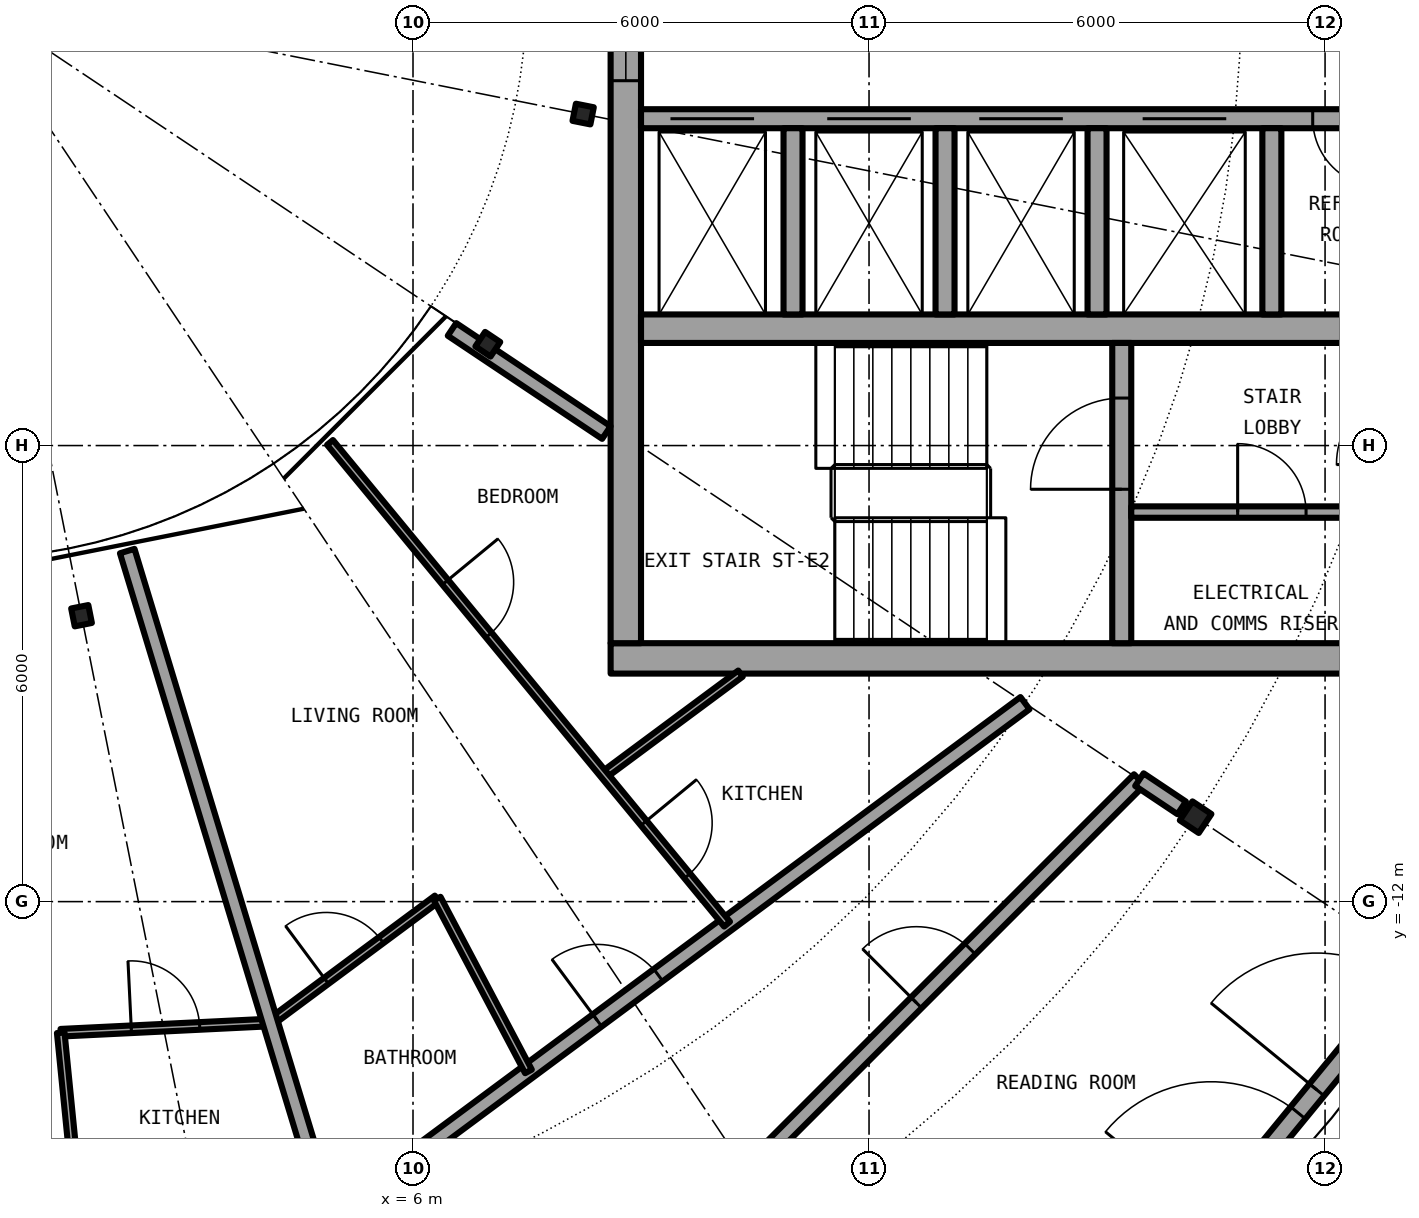
"""IFC4 building model, lengths in metres.
Left out: names, types, materials, properties, quantities, classifications, styles, units other than length and angle.
Written with IfcOpenShell. Run it as: python <this file> out.ifc"""

import sys

from ifc_helpers import new_model, si_unit, direction, frame, frame_2d, origin, origin_2d, place, context, subcontext, project, spatial, rectangle, i_section, extrude, element, fill, save


model = new_model("IFC4")
c1 = context("Model", 3, precision=1e-05, world=origin(), true_north=direction((0.0, 1.0)))
c2 = subcontext(c1, "Body", "Model", "MODEL_VIEW")
j1 = project(units=[si_unit("LENGTHUNIT", "METRE"), si_unit("PLANEANGLEUNIT", "RADIAN")], contexts=[c1])
p1 = place(None, origin())
s1 = spatial("IfcSite", under=j1, at=p1, CompositionType="ELEMENT")
p2 = place(p1, origin())
s2 = spatial("IfcBuilding", under=s1, at=p2, CompositionType="ELEMENT")
p3 = place(p2, frame((0.0, 0.0, 249.3)))
s3 = spatial("IfcBuildingStorey", under=s2, at=p3, CompositionType="ELEMENT", Elevation=249.3)
p4 = place(p3, frame((16.297, -10.889, 0.0), z_axis=(0.0, 0.0, 1.0), x_axis=(0.831469612303, -0.55557023302, 0.0)))
e1 = element("IfcColumn", 1, at=p4, inside=s3, PredefinedType="COLUMN", context=c2, shape_type="SweptSolid", body=[
    extrude(i_section(OverallWidth=0.3, OverallDepth=0.3, WebThickness=0.011, FlangeThickness=0.019, FilletRadius=0.027, at=origin_2d()), origin(), (0.0, 0.0, 1.0), 3.05),
])
for number, where, z_axis, x_axis in (
    (2, (1.639, -8.239, 0.0), (0.0, 0.0, 1.0), (0.195, -0.981, 0.0)),
    (3, (6.984, -4.667, 0.0), (0.0, 0.0, 1.0), (0.831, -0.556, 0.0)),
    (4, (8.239, -1.639, 0.0), (0.0, 0.0, 1.0), (0.981, -0.195, 0.0)),
):
    element("IfcColumn", number, at=place(p3, frame(where, z_axis=z_axis, x_axis=x_axis)), inside=s3, PredefinedType="COLUMN", context=c2, shape_type="SweptSolid", body=[
        extrude(i_section(OverallWidth=0.24, OverallDepth=0.23, WebThickness=0.008, FlangeThickness=0.012, FilletRadius=0.021, at=origin_2d()), origin(), (0.0, 0.0, 1.0), 3.05),
    ])
p5 = place(p3, frame((16.352, -16.352, 0.0), z_axis=(0.0, 0.0, 1.0), x_axis=(0.634418942337, 0.772989395532, 0.0)))
e5 = element("IfcWall", 5, at=p5, inside=s3, PredefinedType="SOLIDWALL", context=c2, shape_type="SweptSolid", body=[
    extrude(rectangle(XDim=4.533, YDim=0.25, at=frame_2d((2.267, 0.0))), origin(), (0.0, 0.0, 1.0), 2.7),
])
p6 = place(p5, frame((0.236, 0.0, 0.0)))
e6 = element("IfcOpeningElement", 6, at=p6, cuts=e5, PredefinedType="OPENING", context=c2, shape_type="SweptSolid", body=[
    extrude(rectangle(XDim=1.8, YDim=2.2, at=frame_2d((0.9, 1.1))), frame((0.0, 0.135, 0.0), z_axis=(0.0, -1.0, 0.0), x_axis=(1.0, 0.0, 0.0)), (0.0, 0.0, 1.0), 0.27),
])
p7 = place(p5, frame((2.427, 0.0, 0.0)))
e7 = element("IfcOpeningElement", 7, at=p7, cuts=e5, PredefinedType="OPENING", context=c2, shape_type="SweptSolid", body=[
    extrude(rectangle(XDim=1.8, YDim=2.2, at=frame_2d((0.9, 1.1))), frame((0.0, 0.135, 0.0), z_axis=(0.0, -1.0, 0.0), x_axis=(1.0, 0.0, 0.0)), (0.0, 0.0, 1.0), 0.27),
])
p8 = place(p3, frame((8.6, -8.8, 0.0), z_axis=(0.0, 0.0, 1.0), x_axis=(1.0, 0.0, 0.0)))
e8 = element("IfcWall", 8, at=p8, inside=s3, PredefinedType="SHEAR", context=c2, shape_type="SweptSolid", body=[
    extrude(rectangle(XDim=12.5, YDim=0.4, at=frame_2d((6.25, 0.0))), origin(), (0.0, 0.0, 1.0), 3.05),
])
p9 = place(p8, frame((10.825, 0.0, 0.0)))
e9 = element("IfcOpeningElement", 9, at=p9, cuts=e8, PredefinedType="OPENING", context=c2, shape_type="SweptSolid", body=[
    extrude(rectangle(XDim=1.2, YDim=2.3, at=frame_2d((0.6, 1.15))), frame((0.0, 0.21, 0.0), z_axis=(0.0, -1.0, 0.0), x_axis=(1.0, 0.0, 0.0)), (0.0, 0.0, 1.0), 0.42),
])
p10 = place(p3, frame((8.8, -8.6, 0.0), z_axis=(0.0, 0.0, 1.0), x_axis=(0.0, 1.0, 0.0)))
e10 = element("IfcWall", 10, at=p10, inside=s3, PredefinedType="SHEAR", context=c2, shape_type="SweptSolid", body=[
    extrude(rectangle(XDim=17.2, YDim=0.4, at=frame_2d((8.6, 0.0))), origin(), (0.0, 0.0, 1.0), 3.05),
])
p11 = place(p10, frame((7.4, 0.0, 0.1)))
e11 = element("IfcOpeningElement", 11, at=p11, cuts=e10, PredefinedType="OPENING", context=c2, shape_type="SweptSolid", body=[
    extrude(rectangle(XDim=2.4, YDim=2.2, at=frame_2d((1.2, 1.1))), frame((0.0, 0.21, 0.0), z_axis=(0.0, -1.0, 0.0), x_axis=(1.0, 0.0, 0.0)), (0.0, 0.0, 1.0), 0.42),
])
p12 = place(p3, frame((19.15, -1.7, 0.0), z_axis=(0.0, 0.0, 1.0), x_axis=(-1.0, 0.0, 0.0)))
e12 = element("IfcWall", 12, at=p12, inside=s3, PredefinedType="SHEAR", context=c2, shape_type="SweptSolid", body=[
    extrude(rectangle(XDim=10.15, YDim=0.25, at=frame_2d((5.075, 0.0))), origin(), (0.0, 0.0, 1.0), 3.05),
])
p13 = place(p12, frame((8.663, 0.0, 0.0)))
e13 = element("IfcOpeningElement", 13, at=p13, cuts=e12, PredefinedType="OPENING", context=c2, shape_type="SweptSolid", body=[
    extrude(rectangle(XDim=1.1, YDim=2.3, at=frame_2d((0.55, 1.15))), frame((0.0, 0.135, 0.0), z_axis=(0.0, -1.0, 0.0), x_axis=(1.0, 0.0, 0.0)), (0.0, 0.0, 1.0), 0.27),
])
p14 = place(p12, frame((6.6, 0.0, 0.0)))
e14 = element("IfcOpeningElement", 14, at=p14, cuts=e12, PredefinedType="OPENING", context=c2, shape_type="SweptSolid", body=[
    extrude(rectangle(XDim=1.1, YDim=2.3, at=frame_2d((0.55, 1.15))), frame((0.0, 0.135, 0.0), z_axis=(0.0, -1.0, 0.0), x_axis=(1.0, 0.0, 0.0)), (0.0, 0.0, 1.0), 0.27),
])
p15 = place(p12, frame((4.6, 0.0, 0.0)))
e15 = element("IfcOpeningElement", 15, at=p15, cuts=e12, PredefinedType="OPENING", context=c2, shape_type="SweptSolid", body=[
    extrude(rectangle(XDim=1.1, YDim=2.3, at=frame_2d((0.55, 1.15))), frame((0.0, 0.135, 0.0), z_axis=(0.0, -1.0, 0.0), x_axis=(1.0, 0.0, 0.0)), (0.0, 0.0, 1.0), 0.27),
])
p16 = place(p12, frame((2.45, 0.0, 0.0)))
e16 = element("IfcOpeningElement", 16, at=p16, cuts=e12, PredefinedType="OPENING", context=c2, shape_type="SweptSolid", body=[
    extrude(rectangle(XDim=1.1, YDim=2.3, at=frame_2d((0.55, 1.15))), frame((0.0, 0.135, 0.0), z_axis=(0.0, -1.0, 0.0), x_axis=(1.0, 0.0, 0.0)), (0.0, 0.0, 1.0), 0.27),
])
p17 = place(p12, frame((0.413, 0.0, 0.0)))
e17 = element("IfcOpeningElement", 17, at=p17, cuts=e12, PredefinedType="OPENING", context=c2, shape_type="SweptSolid", body=[
    extrude(rectangle(XDim=0.9, YDim=2.3, at=frame_2d((0.45, 1.15))), frame((0.0, 0.135, 0.0), z_axis=(0.0, -1.0, 0.0), x_axis=(1.0, 0.0, 0.0)), (0.0, 0.0, 1.0), 0.27),
])
p18 = place(p3, frame((9.0, -4.462, 0.0), z_axis=(0.0, 0.0, 1.0), x_axis=(1.0, 0.0, 0.0)))
e18 = element("IfcWall", 18, at=p18, inside=s3, PredefinedType="SHEAR", context=c2, shape_type="SweptSolid", body=[
    extrude(rectangle(XDim=10.15, YDim=0.375, at=frame_2d((5.075, 0.0))), origin(), (0.0, 0.0, 1.0), 3.05),
])
p19 = place(p3, frame((15.325, -8.6, 0.0), z_axis=(0.0, 0.0, 1.0), x_axis=(0.0, 1.0, 0.0)))
e19 = element("IfcWall", 19, at=p19, inside=s3, PredefinedType="SHEAR", context=c2, shape_type="SweptSolid", body=[
    extrude(rectangle(XDim=3.95, YDim=0.25, at=frame_2d((1.975, 0.0))), origin(), (0.0, 0.0, 1.0), 3.05),
])
p20 = place(p19, frame((2.025, 0.0, 0.0)))
e20 = element("IfcOpeningElement", 20, at=p20, cuts=e19, PredefinedType="OPENING", context=c2, shape_type="SweptSolid", body=[
    extrude(rectangle(XDim=1.2, YDim=2.3, at=frame_2d((0.6, 1.15))), frame((0.0, 0.135, 0.0), z_axis=(0.0, -1.0, 0.0), x_axis=(1.0, 0.0, 0.0)), (0.0, 0.0, 1.0), 0.27),
])
for number, where, z_axis, x_axis in (
    (21, (15.0, -1.825, 0.0), (0.0, 0.0, 1.0), (0.0, -1.0, 0.0)),
    (22, (17.3, -1.825, 0.0), (0.0, 0.0, 1.0), (0.0, -1.0, 0.0)),
    (23, (11.0, -1.825, 0.0), (0.0, 0.0, 1.0), (0.0, -1.0, 0.0)),
    (24, (13.0, -1.825, 0.0), (0.0, 0.0, 1.0), (0.0, -1.0, 0.0)),
):
    element("IfcWall", number, at=place(p3, frame(where, z_axis=z_axis, x_axis=x_axis)), inside=s3, PredefinedType="SOLIDWALL", context=c2, shape_type="SweptSolid", body=[
        extrude(rectangle(XDim=2.45, YDim=0.25, at=frame_2d((1.225, 0.0))), origin(), (0.0, 0.0, 1.0), 2.7),
    ])
p21 = place(p3, frame((15.45, -6.875, 0.0), z_axis=(0.0, 0.0, 1.0), x_axis=(1.0, 0.0, 0.0)))
e25 = element("IfcWall", 25, at=p21, inside=s3, PredefinedType="PARTITIONING", context=c2, shape_type="SweptSolid", body=[
    extrude(rectangle(XDim=3.7, YDim=0.15, at=frame_2d((1.85, 0.0))), origin(), (0.0, 0.0, 1.0), 2.7),
])
p22 = place(p21, frame((1.4, 0.0, 0.0)))
e26 = element("IfcOpeningElement", 26, at=p22, cuts=e25, PredefinedType="OPENING", context=c2, shape_type="SweptSolid", body=[
    extrude(rectangle(XDim=0.9, YDim=2.3, at=frame_2d((0.45, 1.15))), frame((0.0, 0.085, 0.0), z_axis=(0.0, -1.0, 0.0), x_axis=(1.0, 0.0, 0.0)), (0.0, 0.0, 1.0), 0.17),
])
p23 = place(p3, frame((10.395, -15.557, 0.0), z_axis=(0.0, 0.0, 1.0), x_axis=(0.707106781187, 0.707106781187, 0.0)))
e27 = element("IfcWall", 27, at=p23, inside=s3, PredefinedType="PARTITIONING", context=c2, shape_type="SweptSolid", body=[
    extrude(rectangle(XDim=7.3, YDim=0.2, at=frame_2d((3.65, 0.0))), origin(), (0.0, 0.0, 1.0), 2.7),
])
p24 = place(p23, frame((3.15, 0.0, 0.0)))
e28 = element("IfcOpeningElement", 28, at=p24, cuts=e27, PredefinedType="OPENING", context=c2, shape_type="SweptSolid", body=[
    extrude(rectangle(XDim=1.0, YDim=2.3, at=frame_2d((0.5, 1.15))), frame((0.0, 0.11, 0.0), z_axis=(0.0, -1.0, 0.0), x_axis=(1.0, 0.0, 0.0)), (0.0, 0.0, 1.0), 0.22),
])
p25 = place(p3, frame((4.906, -16.172, 0.0), z_axis=(0.0, 0.0, 1.0), x_axis=(0.803204584823, 0.59570327758, 0.0)))
e29 = element("IfcWall", 29, at=p25, inside=s3, PredefinedType="PARTITIONING", context=c2, shape_type="SweptSolid", body=[
    extrude(rectangle(XDim=11.387, YDim=0.2, at=frame_2d((5.693, 0.0))), origin(), (0.0, 0.0, 1.0), 2.7),
])
p26 = place(p25, frame((4.38, 0.0, 0.0)))
e30 = element("IfcOpeningElement", 30, at=p26, cuts=e29, PredefinedType="OPENING", context=c2, shape_type="SweptSolid", body=[
    extrude(rectangle(XDim=1.0, YDim=2.3, at=frame_2d((0.5, 1.15))), frame((0.0, 0.11, 0.0), z_axis=(0.0, -1.0, 0.0), x_axis=(1.0, 0.0, 0.0)), (0.0, 0.0, 1.0), 0.22),
])
p27 = place(p3, frame((1.365, -13.725, 0.0), z_axis=(0.0, 0.0, 1.0), x_axis=(0.99880320044, 0.048909782152, 0.0)))
e31 = element("IfcWall", 31, at=p27, inside=s3, PredefinedType="PARTITIONING", context=c2, shape_type="SweptSolid", body=[
    extrude(rectangle(XDim=2.76, YDim=0.1, at=frame_2d((1.38, 0.0))), origin(), (0.0, 0.0, 1.0), 2.7),
])
p28 = place(p27, frame((0.93, 0.0, 0.0)))
e32 = element("IfcOpeningElement", 32, at=p28, cuts=e31, PredefinedType="OPENING", context=c2, shape_type="SweptSolid", body=[
    extrude(rectangle(XDim=0.9, YDim=2.3, at=frame_2d((0.45, 1.15))), frame((0.0, 0.06, 0.0), z_axis=(0.0, -1.0, 0.0), x_axis=(1.0, 0.0, 0.0)), (0.0, 0.0, 1.0), 0.12),
])
p29 = place(p3, frame((4.121, -13.59, 0.0), z_axis=(0.0, 0.0, 1.0), x_axis=(0.803096649891, 0.595848781935, 0.0)))
e33 = element("IfcWall", 33, at=p29, inside=s3, PredefinedType="PARTITIONING", context=c2, shape_type="SweptSolid", body=[
    extrude(rectangle(XDim=2.734, YDim=0.1, at=frame_2d((1.367, 0.0))), origin(), (0.0, 0.0, 1.0), 2.7),
])
p30 = place(p29, frame((0.919, 0.0, 0.0)))
e34 = element("IfcOpeningElement", 34, at=p30, cuts=e33, PredefinedType="OPENING", context=c2, shape_type="SweptSolid", body=[
    extrude(rectangle(XDim=0.9, YDim=2.3, at=frame_2d((0.45, 1.15))), frame((0.0, 0.06, 0.0), z_axis=(0.0, -1.0, 0.0), x_axis=(1.0, 0.0, 0.0)), (0.0, 0.0, 1.0), 0.12),
])
p31 = place(p3, frame((8.513, -10.332, 0.0), z_axis=(0.0, 0.0, 1.0), x_axis=(0.803224407806, 0.595676548728, 0.0)))
e35 = element("IfcWall", 35, at=p31, inside=s3, PredefinedType="PARTITIONING", context=c2, shape_type="SweptSolid", body=[
    extrude(rectangle(XDim=2.236, YDim=0.1, at=frame_2d((1.118, 0.0))), origin(), (0.0, 0.0, 1.0), 2.7),
])
p32 = place(p3, frame((6.513, -4.472, 0.0), z_axis=(0.0, 0.0, 1.0), x_axis=(0.831450132577, -0.555599385382, 0.0)))
e36 = element("IfcWall", 36, at=p32, inside=s3, PredefinedType="PARTITIONING", context=c2, shape_type="SweptSolid", body=[
    extrude(rectangle(XDim=2.443, YDim=0.2, at=frame_2d((1.221, 0.0))), origin(), (0.0, 0.0, 1.0), 2.7),
])
p33 = place(p3, frame((1.365, -13.724, 0.0), z_axis=(0.0, 0.0, 1.0), x_axis=(0.099171803948, -0.995070325807, 0.0)))
e37 = element("IfcWall", 37, at=p33, inside=s3, PredefinedType="PARTITIONING", context=c2, shape_type="SweptSolid", body=[
    extrude(rectangle(XDim=2.622, YDim=0.1, at=frame_2d((1.311, 0.0))), origin(), (0.0, 0.0, 1.0), 2.7),
])
p34 = place(p3, frame((2.24, -7.388, 0.0), z_axis=(0.0, 0.0, 1.0), x_axis=(0.290420725025, -0.956899055531, 0.0)))
e38 = element("IfcWall", 38, at=p34, inside=s3, PredefinedType="PARTITIONING", context=c2, shape_type="SweptSolid", body=[
    extrude(rectangle(XDim=9.18, YDim=0.2, at=frame_2d((4.59, 0.0))), origin(), (0.0, 0.0, 1.0), 2.7),
])
p35 = place(p3, frame((4.908, -5.959, 0.0), z_axis=(0.0, 0.0, 1.0), x_axis=(0.636105207978, -0.771602335652, 0.0)))
e39 = element("IfcWall", 39, at=p35, inside=s3, PredefinedType="PARTITIONING", context=c2, shape_type="SweptSolid", body=[
    extrude(rectangle(XDim=8.213, YDim=0.1, at=frame_2d((4.106, 0.0))), origin(), (0.0, 0.0, 1.0), 2.7),
])
p36 = place(p35, frame((6.49, 0.0, 0.0)))
e40 = element("IfcOpeningElement", 40, at=p36, cuts=e39, PredefinedType="OPENING", context=c2, shape_type="SweptSolid", body=[
    extrude(rectangle(XDim=0.9, YDim=2.3, at=frame_2d((0.45, 1.15))), frame((0.0, 0.06, 0.0), z_axis=(0.0, -1.0, 0.0), x_axis=(1.0, 0.0, 0.0)), (0.0, 0.0, 1.0), 0.12),
])
p37 = place(p35, frame((2.384, 0.0, 0.0)))
e41 = element("IfcOpeningElement", 41, at=p37, cuts=e39, PredefinedType="OPENING", context=c2, shape_type="SweptSolid", body=[
    extrude(rectangle(XDim=0.9, YDim=2.3, at=frame_2d((0.45, 1.15))), frame((0.0, 0.06, 0.0), z_axis=(0.0, -1.0, 0.0), x_axis=(1.0, 0.0, 0.0)), (0.0, 0.0, 1.0), 0.12),
])
p38 = place(p3, frame((6.318, -11.96, 0.0), z_axis=(0.0, 0.0, 1.0), x_axis=(0.467001992543, -0.884256263173, 0.0)))
e42 = element("IfcWall", 42, at=p38, inside=s3, PredefinedType="PARTITIONING", context=c2, shape_type="SweptSolid", body=[
    extrude(rectangle(XDim=2.572, YDim=0.1, at=frame_2d((1.286, 0.0))), origin(), (0.0, 0.0, 1.0), 2.7),
])
p39 = place(p3, frame((15.557, -10.395, 0.0), z_axis=(0.0, 0.0, 1.0), x_axis=(0.831601508083, -0.555372786292, 0.0)))
e43 = element("IfcWall", 43, at=p39, inside=s3, PredefinedType="PARTITIONING", context=c2, shape_type="SweptSolid", body=[
    extrude(rectangle(XDim=0.67, YDim=0.2, at=frame_2d((0.335, 0.0))), origin(), (0.0, 0.0, 1.0), 2.7),
])
p40 = place(p6, origin())
e44 = element("IfcDoor", 44, at=p40, inside=s3, OperationType="SINGLE_SWING_LEFT", PredefinedType="DOOR", context=c2, shape_type="SweptSolid", body=[
    extrude(rectangle(XDim=1.8, YDim=2.2, at=frame_2d((0.9, 1.1))), frame((0.0, 0.025, 0.0), z_axis=(0.0, -1.0, 0.0), x_axis=(1.0, 0.0, 0.0)), (0.0, 0.0, 1.0), 0.05),
])
fill(e6, e44)
p41 = place(p7, origin())
e45 = element("IfcDoor", 45, at=p41, inside=s3, OperationType="SINGLE_SWING_LEFT", PredefinedType="DOOR", context=c2, shape_type="SweptSolid", body=[
    extrude(rectangle(XDim=1.8, YDim=2.2, at=frame_2d((0.9, 1.1))), frame((0.0, 0.025, 0.0), z_axis=(0.0, -1.0, 0.0), x_axis=(1.0, 0.0, 0.0)), (0.0, 0.0, 1.0), 0.05),
])
fill(e7, e45)
p42 = place(p13, origin())
e46 = element("IfcDoor", 46, at=p42, inside=s3, OperationType="DOUBLE_DOOR_SLIDING", PredefinedType="DOOR", context=c2, shape_type="SweptSolid", body=[
    extrude(rectangle(XDim=1.1, YDim=2.3, at=frame_2d((0.55, 1.15))), frame((0.0, 0.025, 0.0), z_axis=(0.0, -1.0, 0.0), x_axis=(1.0, 0.0, 0.0)), (0.0, 0.0, 1.0), 0.05),
])
fill(e13, e46)
p43 = place(p14, origin())
e47 = element("IfcDoor", 47, at=p43, inside=s3, OperationType="DOUBLE_DOOR_SLIDING", PredefinedType="DOOR", context=c2, shape_type="SweptSolid", body=[
    extrude(rectangle(XDim=1.1, YDim=2.3, at=frame_2d((0.55, 1.15))), frame((0.0, 0.025, 0.0), z_axis=(0.0, -1.0, 0.0), x_axis=(1.0, 0.0, 0.0)), (0.0, 0.0, 1.0), 0.05),
])
fill(e14, e47)
p44 = place(p15, origin())
e48 = element("IfcDoor", 48, at=p44, inside=s3, OperationType="DOUBLE_DOOR_SLIDING", PredefinedType="DOOR", context=c2, shape_type="SweptSolid", body=[
    extrude(rectangle(XDim=1.1, YDim=2.3, at=frame_2d((0.55, 1.15))), frame((0.0, 0.025, 0.0), z_axis=(0.0, -1.0, 0.0), x_axis=(1.0, 0.0, 0.0)), (0.0, 0.0, 1.0), 0.05),
])
fill(e15, e48)
p45 = place(p16, origin())
e49 = element("IfcDoor", 49, at=p45, inside=s3, OperationType="DOUBLE_DOOR_SLIDING", PredefinedType="DOOR", context=c2, shape_type="SweptSolid", body=[
    extrude(rectangle(XDim=1.1, YDim=2.3, at=frame_2d((0.55, 1.15))), frame((0.0, 0.025, 0.0), z_axis=(0.0, -1.0, 0.0), x_axis=(1.0, 0.0, 0.0)), (0.0, 0.0, 1.0), 0.05),
])
fill(e16, e49)
p46 = place(p17, origin())
e50 = element("IfcDoor", 50, at=p46, inside=s3, OperationType="SINGLE_SWING_RIGHT", PredefinedType="DOOR", context=c2, shape_type="SweptSolid", body=[
    extrude(rectangle(XDim=0.9, YDim=2.3, at=frame_2d((0.45, 1.15))), frame((0.0, 0.025, 0.0), z_axis=(0.0, -1.0, 0.0), x_axis=(1.0, 0.0, 0.0)), (0.0, 0.0, 1.0), 0.05),
])
fill(e17, e50)
p47 = place(p22, origin())
e51 = element("IfcDoor", 51, at=p47, inside=s3, OperationType="SINGLE_SWING_LEFT", PredefinedType="DOOR", context=c2, shape_type="SweptSolid", body=[
    extrude(rectangle(XDim=0.9, YDim=2.3, at=frame_2d((0.45, 1.15))), frame((0.0, 0.025, 0.0), z_axis=(0.0, -1.0, 0.0), x_axis=(1.0, 0.0, 0.0)), (0.0, 0.0, 1.0), 0.05),
])
fill(e26, e51)
p48 = place(p20, origin())
e52 = element("IfcDoor", 52, at=p48, inside=s3, OperationType="SINGLE_SWING_LEFT", PredefinedType="DOOR", context=c2, shape_type="SweptSolid", body=[
    extrude(rectangle(XDim=1.2, YDim=2.3, at=frame_2d((0.6, 1.15))), frame((0.0, 0.025, 0.0), z_axis=(0.0, -1.0, 0.0), x_axis=(1.0, 0.0, 0.0)), (0.0, 0.0, 1.0), 0.05),
])
fill(e20, e52)
p49 = place(p11, origin())
e53 = element("IfcWindow", 53, at=p49, inside=s3, PartitioningType="SINGLE_PANEL", PredefinedType="WINDOW", context=c2, shape_type="SweptSolid", body=[
    extrude(rectangle(XDim=2.4, YDim=2.2, at=frame_2d((1.2, 1.1))), frame((0.0, 0.03, 0.0), z_axis=(0.0, -1.0, 0.0), x_axis=(1.0, 0.0, 0.0)), (0.0, 0.0, 1.0), 0.06),
])
fill(e11, e53)
p50 = place(p24, origin())
e54 = element("IfcDoor", 54, at=p50, inside=s3, OperationType="SINGLE_SWING_LEFT", PredefinedType="DOOR", context=c2, shape_type="SweptSolid", body=[
    extrude(rectangle(XDim=1.0, YDim=2.3, at=frame_2d((0.5, 1.15))), frame((0.0, 0.025, 0.0), z_axis=(0.0, -1.0, 0.0), x_axis=(1.0, 0.0, 0.0)), (0.0, 0.0, 1.0), 0.05),
])
fill(e28, e54)
p51 = place(p28, origin())
e55 = element("IfcDoor", 55, at=p51, inside=s3, OperationType="SINGLE_SWING_RIGHT", PredefinedType="DOOR", context=c2, shape_type="SweptSolid", body=[
    extrude(rectangle(XDim=0.9, YDim=2.3, at=frame_2d((0.45, 1.15))), frame((0.0, 0.025, 0.0), z_axis=(0.0, -1.0, 0.0), x_axis=(1.0, 0.0, 0.0)), (0.0, 0.0, 1.0), 0.05),
])
fill(e32, e55)
p52 = place(p26, origin())
e56 = element("IfcDoor", 56, at=p52, inside=s3, OperationType="SINGLE_SWING_LEFT", PredefinedType="DOOR", context=c2, shape_type="SweptSolid", body=[
    extrude(rectangle(XDim=1.0, YDim=2.3, at=frame_2d((0.5, 1.15))), frame((0.0, 0.025, 0.0), z_axis=(0.0, -1.0, 0.0), x_axis=(1.0, 0.0, 0.0)), (0.0, 0.0, 1.0), 0.05),
])
fill(e30, e56)
p53 = place(p30, origin())
e57 = element("IfcDoor", 57, at=p53, inside=s3, OperationType="SINGLE_SWING_RIGHT", PredefinedType="DOOR", context=c2, shape_type="SweptSolid", body=[
    extrude(rectangle(XDim=0.9, YDim=2.3, at=frame_2d((0.45, 1.15))), frame((0.0, 0.025, 0.0), z_axis=(0.0, -1.0, 0.0), x_axis=(1.0, 0.0, 0.0)), (0.0, 0.0, 1.0), 0.05),
])
fill(e34, e57)
p54 = place(p36, origin())
e58 = element("IfcDoor", 58, at=p54, inside=s3, OperationType="SINGLE_SWING_RIGHT", PredefinedType="DOOR", context=c2, shape_type="SweptSolid", body=[
    extrude(rectangle(XDim=0.9, YDim=2.3, at=frame_2d((0.45, 1.15))), frame((0.0, 0.025, 0.0), z_axis=(0.0, -1.0, 0.0), x_axis=(1.0, 0.0, 0.0)), (0.0, 0.0, 1.0), 0.05),
])
fill(e40, e58)
p55 = place(p37, origin())
e59 = element("IfcDoor", 59, at=p55, inside=s3, OperationType="SINGLE_SWING_LEFT", PredefinedType="DOOR", context=c2, shape_type="SweptSolid", body=[
    extrude(rectangle(XDim=0.9, YDim=2.3, at=frame_2d((0.45, 1.15))), frame((0.0, 0.025, 0.0), z_axis=(0.0, -1.0, 0.0), x_axis=(1.0, 0.0, 0.0)), (0.0, 0.0, 1.0), 0.05),
])
fill(e41, e59)
save(model, sys.argv[1])
